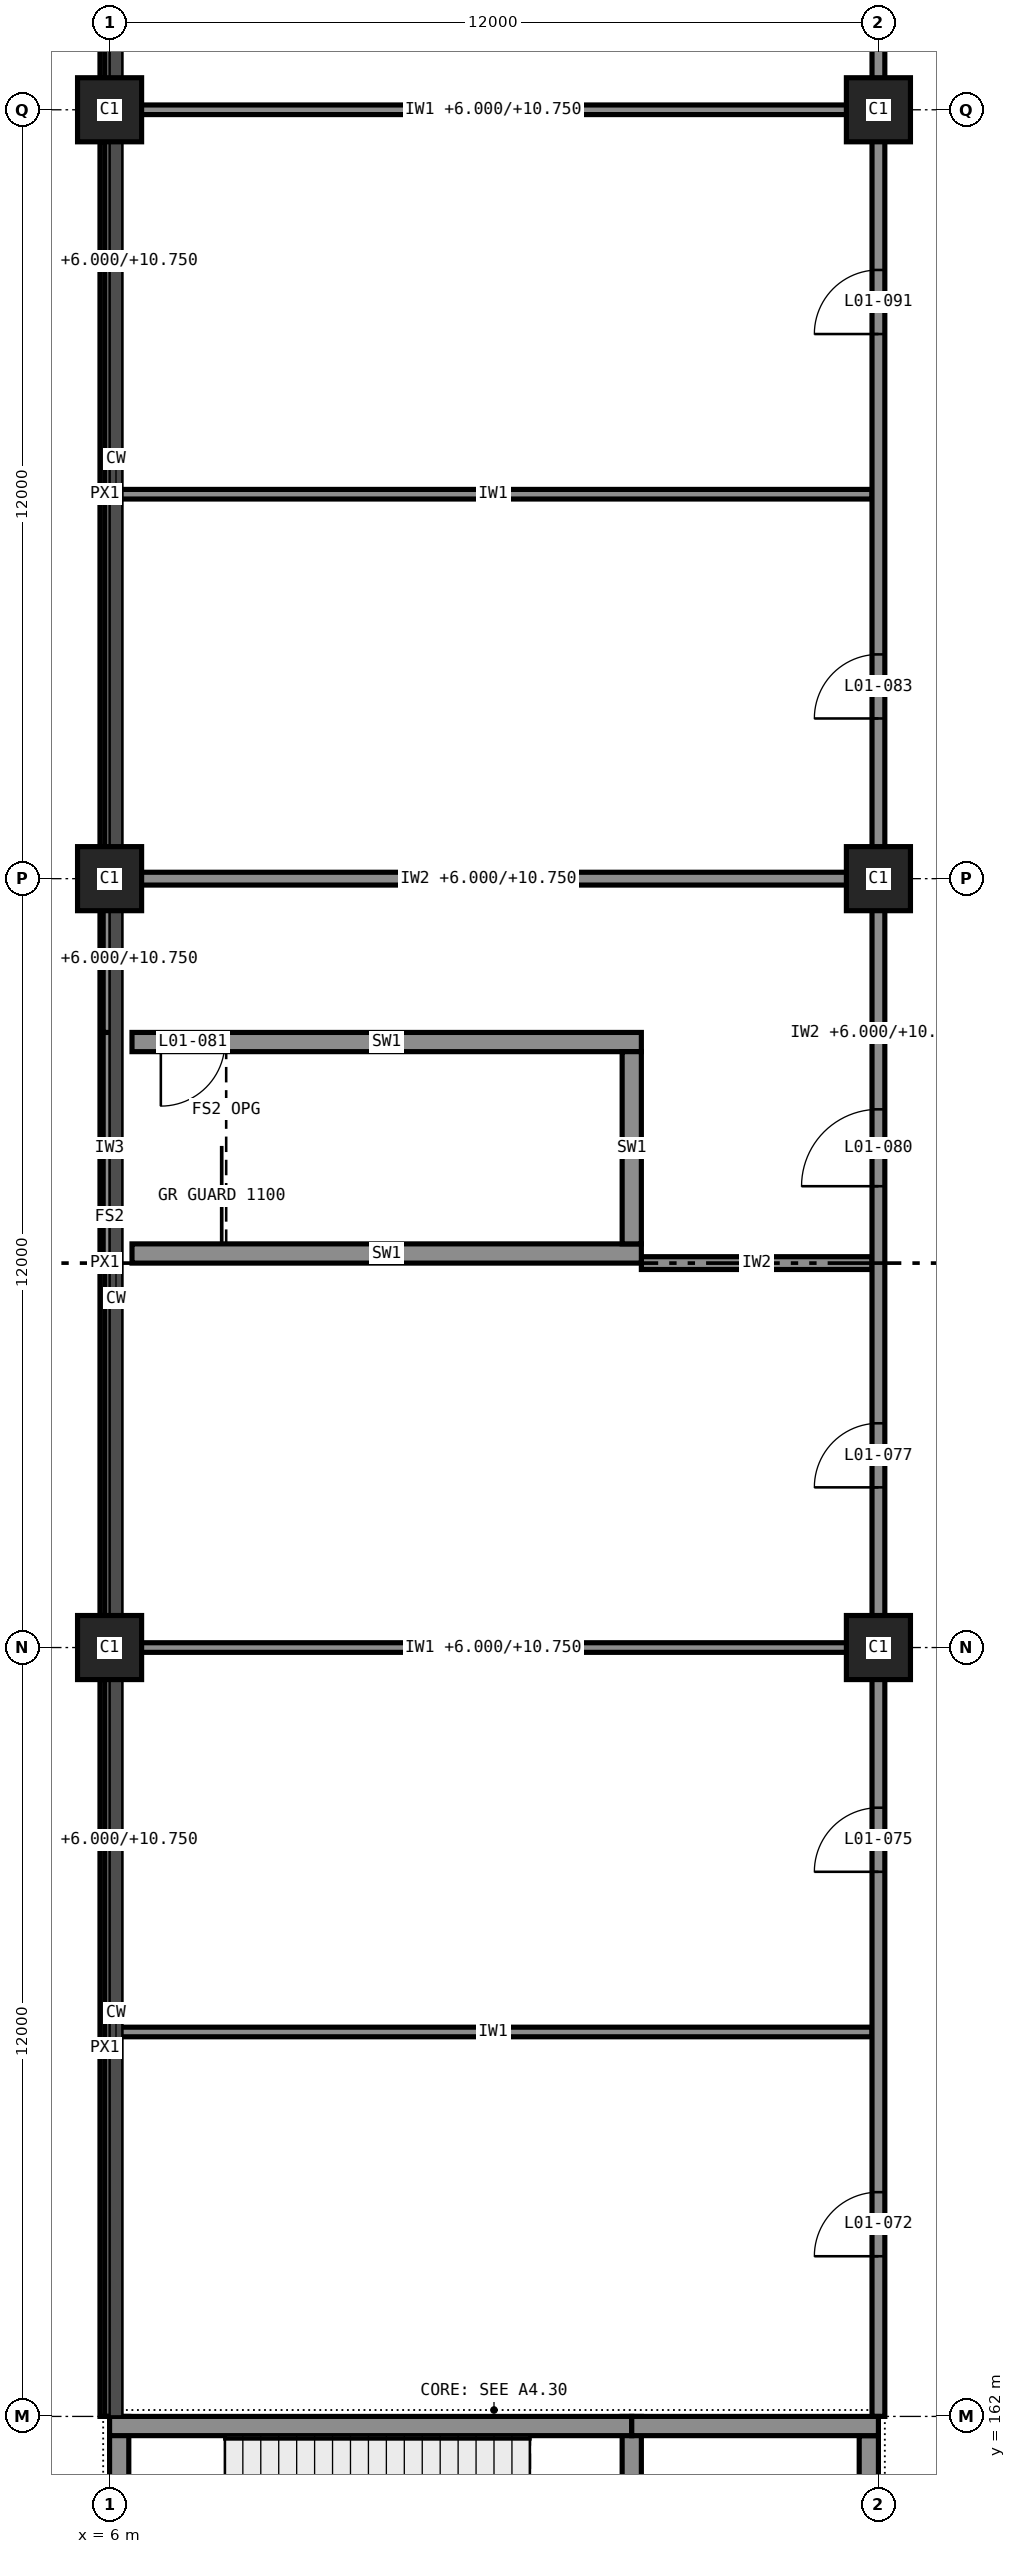
"""IFC4 building model, lengths in metres.
Left out: names, types, materials, properties, quantities, classifications, styles, units other than length and angle.
Written with IfcOpenShell. Run it as: python <this file> out.ifc"""

import sys

from ifc_helpers import new_model, si_unit, direction, frame, frame_2d, origin, origin_2d, place, context, subcontext, project, spatial, rectangle, extrude, element, fill, save


model = new_model("IFC4")
c1 = context("Model", 3, precision=1e-05, world=origin(), true_north=direction((0.0, 1.0)))
c2 = subcontext(c1, "Body", "Model", "MODEL_VIEW")
j1 = project(units=[si_unit("LENGTHUNIT", "METRE"), si_unit("PLANEANGLEUNIT", "RADIAN")], contexts=[c1])
p1 = place(None, origin())
s1 = spatial("IfcSite", under=j1, at=p1, CompositionType="ELEMENT")
p2 = place(p1, origin())
s2 = spatial("IfcBuilding", under=s1, at=p2, CompositionType="ELEMENT")
p3 = place(p2, frame((0.0, 0.0, 6.0)))
s3 = spatial("IfcBuildingStorey", under=s2, at=p3, CompositionType="ELEMENT", Elevation=6.0)
for number, where, z_axis, x_axis in (
    (1, (6.0, 174.0, 0.0), (0.0, 0.0, 1.0), (1.0, 0.0, 0.0)),
    (2, (6.0, 186.0, 0.0), (0.0, 0.0, 1.0), (1.0, 0.0, 0.0)),
    (3, (6.0, 198.0, 0.0), (0.0, 0.0, 1.0), (1.0, 0.0, 0.0)),
    (4, (18.0, 174.0, 0.0), (0.0, 0.0, 1.0), (1.0, 0.0, 0.0)),
    (5, (18.0, 186.0, 0.0), (0.0, 0.0, 1.0), (1.0, 0.0, 0.0)),
    (6, (18.0, 198.0, 0.0), (0.0, 0.0, 1.0), (1.0, 0.0, 0.0)),
):
    element("IfcColumn", number, at=place(p3, frame(where, z_axis=z_axis, x_axis=x_axis)), inside=s3, PredefinedType="COLUMN", context=c2, shape_type="SweptSolid", body=[
        extrude(rectangle(XDim=1.0, YDim=1.0, at=origin_2d()), origin(), (0.0, 0.0, 1.0), 6.0),
    ])
p4 = place(p3, frame((6.35, 180.15, 0.0), z_axis=(0.0, 0.0, 1.0), x_axis=(1.0, 0.0, 0.0)))
e7 = element("IfcWall", 7, at=p4, inside=s3, PredefinedType="SHEAR", context=c2, shape_type="SweptSolid", body=[
    extrude(rectangle(XDim=7.95, YDim=0.3, at=frame_2d((3.975, 0.0))), origin(), (0.0, 0.0, 1.0), 5.75),
])
p5 = place(p3, frame((6.35, 183.45, 0.0), z_axis=(0.0, 0.0, 1.0), x_axis=(1.0, 0.0, 0.0)))
e8 = element("IfcWall", 8, at=p5, inside=s3, PredefinedType="SHEAR", context=c2, shape_type="SweptSolid", body=[
    extrude(rectangle(XDim=7.95, YDim=0.3, at=frame_2d((3.975, 0.0))), origin(), (0.0, 0.0, 1.0), 5.75),
])
p6 = place(p5, frame((0.45, 0.0, 0.0)))
e9 = element("IfcOpeningElement", 9, at=p6, cuts=e8, PredefinedType="OPENING", context=c2, shape_type="SweptSolid", body=[
    extrude(rectangle(XDim=1.0, YDim=2.1, at=frame_2d((0.5, 1.05))), frame((0.0, 0.16, 0.0), z_axis=(0.0, -1.0, 0.0), x_axis=(1.0, 0.0, 0.0)), (0.0, 0.0, 1.0), 0.32),
])
p7 = place(p3, frame((14.15, 180.3, 0.0), z_axis=(0.0, 0.0, 1.0), x_axis=(0.0, 1.0, 0.0)))
e10 = element("IfcWall", 10, at=p7, inside=s3, PredefinedType="SHEAR", context=c2, shape_type="SweptSolid", body=[
    extrude(rectangle(XDim=3.0, YDim=0.3, at=frame_2d((1.5, 0.0))), origin(), (0.0, 0.0, 1.0), 5.75),
])
p8 = place(p3, frame((6.0, 161.85, 0.0), z_axis=(0.0, 0.0, 1.0), x_axis=(1.0, 0.0, 0.0)))
e11 = element("IfcWall", 11, at=p8, inside=s3, PredefinedType="SHEAR", context=c2, shape_type="SweptSolid", body=[
    extrude(rectangle(XDim=8.15, YDim=0.3, at=frame_2d((4.075, 0.0))), origin(), (0.0, 0.0, 1.0), 5.75),
])
p9 = place(p3, frame((14.15, 161.85, 0.0), z_axis=(0.0, 0.0, 1.0), x_axis=(1.0, 0.0, 0.0)))
e12 = element("IfcWall", 12, at=p9, inside=s3, PredefinedType="SHEAR", context=c2, shape_type="SweptSolid", body=[
    extrude(rectangle(XDim=3.85, YDim=0.3, at=frame_2d((1.925, 0.0))), origin(), (0.0, 0.0, 1.0), 5.75),
])
p10 = place(p3, frame((6.15, 158.55, 0.0), z_axis=(0.0, 0.0, 1.0), x_axis=(0.0, 1.0, 0.0)))
e13 = element("IfcWall", 13, at=p10, inside=s3, PredefinedType="SHEAR", context=c2, shape_type="SweptSolid", body=[
    extrude(rectangle(XDim=3.45, YDim=0.3, at=frame_2d((1.725, 0.0))), origin(), (0.0, 0.0, 1.0), 5.75),
])
p11 = place(p3, frame((17.85, 158.55, 0.0), z_axis=(0.0, 0.0, 1.0), x_axis=(0.0, 1.0, 0.0)))
e14 = element("IfcWall", 14, at=p11, inside=s3, PredefinedType="SHEAR", context=c2, shape_type="SweptSolid", body=[
    extrude(rectangle(XDim=3.15, YDim=0.3, at=frame_2d((1.575, 0.0))), origin(), (0.0, 0.0, 1.0), 5.75),
])
p12 = place(p11, frame((1.15, 0.0, 0.0)))
e15 = element("IfcOpeningElement", 15, at=p12, cuts=e14, PredefinedType="OPENING", context=c2, shape_type="SweptSolid", body=[
    extrude(rectangle(XDim=1.0, YDim=2.1, at=frame_2d((0.5, 1.05))), frame((0.0, 0.16, 0.0), z_axis=(0.0, -1.0, 0.0), x_axis=(1.0, 0.0, 0.0)), (0.0, 0.0, 1.0), 0.32),
])
p13 = place(p3, frame((14.15, 158.7, 0.0), z_axis=(0.0, 0.0, 1.0), x_axis=(0.0, 1.0, 0.0)))
e16 = element("IfcWall", 16, at=p13, inside=s3, PredefinedType="SHEAR", context=c2, shape_type="SweptSolid", body=[
    extrude(rectangle(XDim=3.3, YDim=0.3, at=frame_2d((1.65, 0.0))), origin(), (0.0, 0.0, 1.0), 5.75),
])
p14 = place(p3, frame((5.925, 210.0, 5.75), z_axis=(0.0, 0.0, 1.0), x_axis=(0.0, -1.0, 0.0)))
e17 = element("IfcWall", 17, at=p14, inside=s3, PredefinedType="STANDARD", context=c2, shape_type="SweptSolid", body=[
    extrude(rectangle(XDim=11.5, YDim=0.15, at=frame_2d((5.75, 0.0))), origin(), (0.0, 0.0, 1.0), 0.25),
])
for number, where, z_axis, x_axis in (
    (18, (5.925, 197.5, 5.75), (0.0, 0.0, 1.0), (0.0, -1.0, 0.0)),
    (19, (5.925, 185.5, 5.75), (0.0, 0.0, 1.0), (0.0, -1.0, 0.0)),
):
    element("IfcWall", number, at=place(p3, frame(where, z_axis=z_axis, x_axis=x_axis)), inside=s3, PredefinedType="STANDARD", context=c2, shape_type="SweptSolid", body=[
        extrude(rectangle(XDim=11.0, YDim=0.15, at=frame_2d((5.5, 0.0))), origin(), (0.0, 0.0, 1.0), 0.25),
    ])
p15 = place(p3, frame((5.925, 173.5, 5.75), z_axis=(0.0, 0.0, 1.0), x_axis=(0.0, -1.0, 0.0)))
e20 = element("IfcWall", 20, at=p15, inside=s3, PredefinedType="STANDARD", context=c2, shape_type="SweptSolid", body=[
    extrude(rectangle(XDim=11.5, YDim=0.15, at=frame_2d((5.75, 0.0))), origin(), (0.0, 0.0, 1.0), 0.25),
])
p16 = place(p3, frame((6.075, 168.0, 0.0), z_axis=(0.0, 0.0, 1.0), x_axis=(1.0, 0.0, 0.0)))
e21 = element("IfcWall", 21, at=p16, inside=s3, PredefinedType="PARTITIONING", context=c2, shape_type="SweptSolid", body=[
    extrude(rectangle(XDim=11.825, YDim=0.15, at=frame_2d((5.913, 0.0))), origin(), (0.0, 0.0, 1.0), 5.75),
])
p17 = place(p3, frame((6.075, 174.0, 0.0), z_axis=(0.0, 0.0, 1.0), x_axis=(1.0, 0.0, 0.0)))
e22 = element("IfcWall", 22, at=p17, inside=s3, PredefinedType="PARTITIONING", context=c2, shape_type="SweptSolid", body=[
    extrude(rectangle(XDim=11.825, YDim=0.15, at=frame_2d((5.913, 0.0))), origin(), (0.0, 0.0, 1.0), 4.75),
])
p18 = place(p3, frame((14.3, 180.0, 0.0), z_axis=(0.0, 0.0, 1.0), x_axis=(1.0, 0.0, 0.0)))
e23 = element("IfcWall", 23, at=p18, inside=s3, PredefinedType="PARTITIONING", context=c2, shape_type="SweptSolid", body=[
    extrude(rectangle(XDim=3.6, YDim=0.2, at=frame_2d((1.8, 0.0))), origin(), (0.0, 0.0, 1.0), 5.75),
])
p19 = place(p3, frame((5.925, 186.0, 0.0), z_axis=(0.0, 0.0, 1.0), x_axis=(1.0, 0.0, 0.0)))
e24 = element("IfcWall", 24, at=p19, inside=s3, PredefinedType="PARTITIONING", context=c2, shape_type="SweptSolid", body=[
    extrude(rectangle(XDim=11.975, YDim=0.2, at=frame_2d((5.987, 0.0))), origin(), (0.0, 0.0, 1.0), 4.75),
])
p20 = place(p3, frame((6.075, 192.0, 0.0), z_axis=(0.0, 0.0, 1.0), x_axis=(1.0, 0.0, 0.0)))
e25 = element("IfcWall", 25, at=p20, inside=s3, PredefinedType="PARTITIONING", context=c2, shape_type="SweptSolid", body=[
    extrude(rectangle(XDim=11.825, YDim=0.15, at=frame_2d((5.913, 0.0))), origin(), (0.0, 0.0, 1.0), 5.75),
])
p21 = place(p3, frame((6.075, 198.0, 0.0), z_axis=(0.0, 0.0, 1.0), x_axis=(1.0, 0.0, 0.0)))
e26 = element("IfcWall", 26, at=p21, inside=s3, PredefinedType="PARTITIONING", context=c2, shape_type="SweptSolid", body=[
    extrude(rectangle(XDim=11.825, YDim=0.15, at=frame_2d((5.913, 0.0))), origin(), (0.0, 0.0, 1.0), 4.75),
])
p22 = place(p3, frame((6.0, 162.0, 0.0), z_axis=(0.0, 0.0, 1.0), x_axis=(0.0, 1.0, 0.0)))
e27 = element("IfcWall", 27, at=p22, inside=s3, PredefinedType="PARTITIONING", context=c2, shape_type="SweptSolid", body=[
    extrude(rectangle(XDim=18.0, YDim=0.15, at=frame_2d((9.0, 0.0))), origin(), (0.0, 0.0, 1.0), 4.75),
])
p23 = place(p3, frame((6.0, 180.0, 0.0), z_axis=(0.0, 0.0, 1.0), x_axis=(0.0, 1.0, 0.0)))
e28 = element("IfcWall", 28, at=p23, inside=s3, PredefinedType="PARTITIONING", context=c2, shape_type="SweptSolid", body=[
    extrude(rectangle(XDim=3.6, YDim=0.2, at=frame_2d((1.8, 0.0))), origin(), (0.0, 0.0, 1.0), 4.75),
])
p24 = place(p3, frame((6.0, 183.6, 0.0), z_axis=(0.0, 0.0, 1.0), x_axis=(0.0, 1.0, 0.0)))
e29 = element("IfcWall", 29, at=p24, inside=s3, PredefinedType="PARTITIONING", context=c2, shape_type="SweptSolid", body=[
    extrude(rectangle(XDim=2.3, YDim=0.2, at=frame_2d((1.15, 0.0))), origin(), (0.0, 0.0, 1.0), 4.75),
])
p25 = place(p3, frame((6.0, 186.1, 0.0), z_axis=(0.0, 0.0, 1.0), x_axis=(0.0, 1.0, 0.0)))
e30 = element("IfcWall", 30, at=p25, inside=s3, PredefinedType="PARTITIONING", context=c2, shape_type="SweptSolid", body=[
    extrude(rectangle(XDim=23.9, YDim=0.15, at=frame_2d((11.95, 0.0))), origin(), (0.0, 0.0, 1.0), 4.75),
])
p26 = place(p3, frame((18.0, 162.0, 0.0), z_axis=(0.0, 0.0, 1.0), x_axis=(0.0, 1.0, 0.0)))
e31 = element("IfcWall", 31, at=p26, inside=s3, PredefinedType="PARTITIONING", context=c2, shape_type="SweptSolid", body=[
    extrude(rectangle(XDim=48.0, YDim=0.2, at=frame_2d((24.0, 0.0))), origin(), (0.0, 0.0, 1.0), 4.75),
])
p27 = place(p26, frame((2.5, 0.0, 0.0)))
e32 = element("IfcOpeningElement", 32, at=p27, cuts=e31, PredefinedType="OPENING", context=c2, shape_type="SweptSolid", body=[
    extrude(rectangle(XDim=1.0, YDim=2.1, at=frame_2d((0.5, 1.05))), frame((0.0, 0.11, 0.0), z_axis=(0.0, -1.0, 0.0), x_axis=(1.0, 0.0, 0.0)), (0.0, 0.0, 1.0), 0.22),
])
p28 = place(p26, frame((8.5, 0.0, 0.0)))
e33 = element("IfcOpeningElement", 33, at=p28, cuts=e31, PredefinedType="OPENING", context=c2, shape_type="SweptSolid", body=[
    extrude(rectangle(XDim=1.0, YDim=2.1, at=frame_2d((0.5, 1.05))), frame((0.0, 0.11, 0.0), z_axis=(0.0, -1.0, 0.0), x_axis=(1.0, 0.0, 0.0)), (0.0, 0.0, 1.0), 0.22),
])
p29 = place(p26, frame((14.5, 0.0, 0.0)))
e34 = element("IfcOpeningElement", 34, at=p29, cuts=e31, PredefinedType="OPENING", context=c2, shape_type="SweptSolid", body=[
    extrude(rectangle(XDim=1.0, YDim=2.1, at=frame_2d((0.5, 1.05))), frame((0.0, 0.11, 0.0), z_axis=(0.0, -1.0, 0.0), x_axis=(1.0, 0.0, 0.0)), (0.0, 0.0, 1.0), 0.22),
])
p30 = place(p26, frame((19.2, 0.0, 0.0)))
e35 = element("IfcOpeningElement", 35, at=p30, cuts=e31, PredefinedType="OPENING", context=c2, shape_type="SweptSolid", body=[
    extrude(rectangle(XDim=1.2, YDim=2.1, at=frame_2d((0.6, 1.05))), frame((0.0, 0.11, 0.0), z_axis=(0.0, -1.0, 0.0), x_axis=(1.0, 0.0, 0.0)), (0.0, 0.0, 1.0), 0.22),
])
p31 = place(p26, frame((26.5, 0.0, 0.0)))
e36 = element("IfcOpeningElement", 36, at=p31, cuts=e31, PredefinedType="OPENING", context=c2, shape_type="SweptSolid", body=[
    extrude(rectangle(XDim=1.0, YDim=2.1, at=frame_2d((0.5, 1.05))), frame((0.0, 0.11, 0.0), z_axis=(0.0, -1.0, 0.0), x_axis=(1.0, 0.0, 0.0)), (0.0, 0.0, 1.0), 0.22),
])
p32 = place(p26, frame((32.5, 0.0, 0.0)))
e37 = element("IfcOpeningElement", 37, at=p32, cuts=e31, PredefinedType="OPENING", context=c2, shape_type="SweptSolid", body=[
    extrude(rectangle(XDim=1.0, YDim=2.1, at=frame_2d((0.5, 1.05))), frame((0.0, 0.11, 0.0), z_axis=(0.0, -1.0, 0.0), x_axis=(1.0, 0.0, 0.0)), (0.0, 0.0, 1.0), 0.22),
])
p33 = place(p26, frame((38.5, 0.0, 0.0)))
e38 = element("IfcOpeningElement", 38, at=p33, cuts=e31, PredefinedType="OPENING", context=c2, shape_type="SweptSolid", body=[
    extrude(rectangle(XDim=1.0, YDim=2.1, at=frame_2d((0.5, 1.05))), frame((0.0, 0.11, 0.0), z_axis=(0.0, -1.0, 0.0), x_axis=(1.0, 0.0, 0.0)), (0.0, 0.0, 1.0), 0.22),
])
p34 = place(p26, frame((44.5, 0.0, 0.0)))
e39 = element("IfcOpeningElement", 39, at=p34, cuts=e31, PredefinedType="OPENING", context=c2, shape_type="SweptSolid", body=[
    extrude(rectangle(XDim=1.0, YDim=2.1, at=frame_2d((0.5, 1.05))), frame((0.0, 0.11, 0.0), z_axis=(0.0, -1.0, 0.0), x_axis=(1.0, 0.0, 0.0)), (0.0, 0.0, 1.0), 0.22),
])
p35 = place(p27, origin())
e40 = element("IfcDoor", 40, at=p35, inside=s3, OperationType="SINGLE_SWING_RIGHT", PredefinedType="DOOR", context=c2, shape_type="SweptSolid", body=[
    extrude(rectangle(XDim=1.0, YDim=2.1, at=frame_2d((0.5, 1.05))), frame((0.0, 0.025, 0.0), z_axis=(0.0, -1.0, 0.0), x_axis=(1.0, 0.0, 0.0)), (0.0, 0.0, 1.0), 0.05),
])
fill(e32, e40)
p36 = place(p28, origin())
e41 = element("IfcDoor", 41, at=p36, inside=s3, OperationType="SINGLE_SWING_RIGHT", PredefinedType="DOOR", context=c2, shape_type="SweptSolid", body=[
    extrude(rectangle(XDim=1.0, YDim=2.1, at=frame_2d((0.5, 1.05))), frame((0.0, 0.025, 0.0), z_axis=(0.0, -1.0, 0.0), x_axis=(1.0, 0.0, 0.0)), (0.0, 0.0, 1.0), 0.05),
])
fill(e33, e41)
p37 = place(p29, origin())
e42 = element("IfcDoor", 42, at=p37, inside=s3, OperationType="SINGLE_SWING_RIGHT", PredefinedType="DOOR", context=c2, shape_type="SweptSolid", body=[
    extrude(rectangle(XDim=1.0, YDim=2.1, at=frame_2d((0.5, 1.05))), frame((0.0, 0.025, 0.0), z_axis=(0.0, -1.0, 0.0), x_axis=(1.0, 0.0, 0.0)), (0.0, 0.0, 1.0), 0.05),
])
fill(e34, e42)
p38 = place(p30, origin())
e43 = element("IfcDoor", 43, at=p38, inside=s3, OperationType="SINGLE_SWING_RIGHT", PredefinedType="DOOR", context=c2, shape_type="SweptSolid", body=[
    extrude(rectangle(XDim=1.2, YDim=2.1, at=frame_2d((0.6, 1.05))), frame((0.0, 0.025, 0.0), z_axis=(0.0, -1.0, 0.0), x_axis=(1.0, 0.0, 0.0)), (0.0, 0.0, 1.0), 0.05),
])
fill(e35, e43)
p39 = place(p6, frame((1.0, 0.0, 0.0), z_axis=(0.0, 0.0, 1.0), x_axis=(-1.0, 0.0, 0.0)))
e44 = element("IfcDoor", 44, at=p39, inside=s3, OperationType="SINGLE_SWING_LEFT", PredefinedType="DOOR", context=c2, shape_type="SweptSolid", body=[
    extrude(rectangle(XDim=1.0, YDim=2.1, at=frame_2d((0.5, 1.05))), frame((0.0, 0.025, 0.0), z_axis=(0.0, -1.0, 0.0), x_axis=(1.0, 0.0, 0.0)), (0.0, 0.0, 1.0), 0.05),
])
fill(e9, e44)
p40 = place(p31, origin())
e45 = element("IfcDoor", 45, at=p40, inside=s3, OperationType="SINGLE_SWING_RIGHT", PredefinedType="DOOR", context=c2, shape_type="SweptSolid", body=[
    extrude(rectangle(XDim=1.0, YDim=2.1, at=frame_2d((0.5, 1.05))), frame((0.0, 0.025, 0.0), z_axis=(0.0, -1.0, 0.0), x_axis=(1.0, 0.0, 0.0)), (0.0, 0.0, 1.0), 0.05),
])
fill(e36, e45)
p41 = place(p32, origin())
e46 = element("IfcDoor", 46, at=p41, inside=s3, OperationType="SINGLE_SWING_RIGHT", PredefinedType="DOOR", context=c2, shape_type="SweptSolid", body=[
    extrude(rectangle(XDim=1.0, YDim=2.1, at=frame_2d((0.5, 1.05))), frame((0.0, 0.025, 0.0), z_axis=(0.0, -1.0, 0.0), x_axis=(1.0, 0.0, 0.0)), (0.0, 0.0, 1.0), 0.05),
])
fill(e37, e46)
save(model, sys.argv[1])
